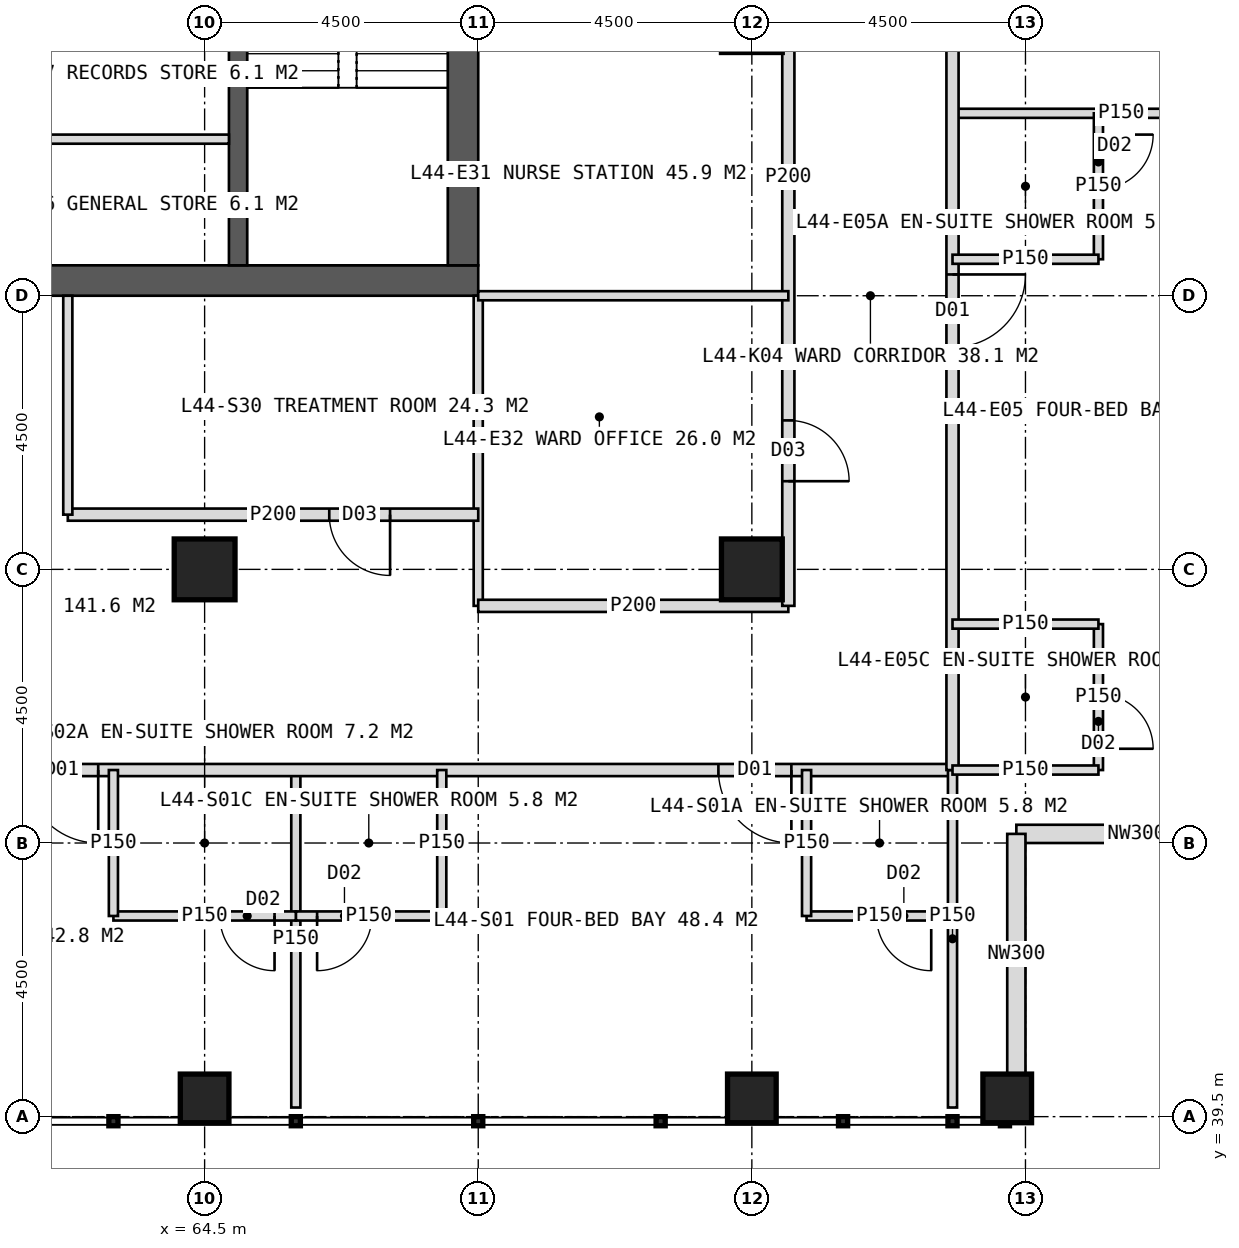
"""IFC4 building model, lengths in metres.
Left out: names, types, materials, properties, quantities, classifications, styles, units other than length and angle.
Written with IfcOpenShell. Run it as: python <this file> out.ifc"""

import sys

from ifc_helpers import new_model, si_unit, direction, frame, frame_2d, origin, origin_2d, place, context, subcontext, project, spatial, rectangle, hollow_rectangle, extrude, element, fill, save


model = new_model("IFC4")
c1 = context("Model", 3, precision=1e-05, world=origin(), true_north=direction((0.0, 1.0)))
c2 = subcontext(c1, "Body", "Model", "MODEL_VIEW")
j1 = project(units=[si_unit("LENGTHUNIT", "METRE"), si_unit("PLANEANGLEUNIT", "RADIAN")], contexts=[c1])
p1 = place(None, origin())
s1 = spatial("IfcSite", under=j1, at=p1, CompositionType="ELEMENT")
p2 = place(p1, origin())
s2 = spatial("IfcBuilding", under=s1, at=p2, CompositionType="ELEMENT")
p3 = place(p2, frame((0.0, 0.0, 185.0)))
s3 = spatial("IfcBuildingStorey", under=s2, at=p3, CompositionType="ELEMENT", Elevation=185.0)
p4 = place(p3, frame((51.0, 53.25, 0.0), z_axis=(0.0, 0.0, 1.0), x_axis=(1.0, 0.0, 0.0)))
e1 = element("IfcWall", 1, at=p4, inside=s3, PredefinedType="SHEAR", context=c2, shape_type="SweptSolid", body=[
    extrude(rectangle(XDim=18.0, YDim=0.5, at=frame_2d((9.0, 0.0))), origin(), (0.0, 0.0, 1.0), 4.0),
])
p5 = place(p4, frame((8.1, 0.0, 0.0)))
e2 = element("IfcOpeningElement", 2, at=p5, cuts=e1, PredefinedType="OPENING", context=c2, shape_type="SweptSolid", body=[
    extrude(rectangle(XDim=1.8, YDim=2.2, at=frame_2d((0.9, 1.1))), frame((0.0, 0.26, 0.0), z_axis=(0.0, -1.0, 0.0), x_axis=(1.0, 0.0, 0.0)), (0.0, 0.0, 1.0), 0.52),
])
p6 = place(p3, frame((68.75, 53.5, 0.0), z_axis=(0.0, 0.0, 1.0), x_axis=(0.0, 1.0, 0.0)))
e3 = element("IfcWall", 3, at=p6, inside=s3, PredefinedType="SHEAR", context=c2, shape_type="SweptSolid", body=[
    extrude(rectangle(XDim=17.0, YDim=0.5, at=frame_2d((8.5, 0.0))), origin(), (0.0, 0.0, 1.0), 4.0),
])
p7 = place(p6, frame((9.6, 0.0, 0.0)))
e4 = element("IfcOpeningElement", 4, at=p7, cuts=e3, PredefinedType="OPENING", context=c2, shape_type="SweptSolid", body=[
    extrude(rectangle(XDim=1.5, YDim=2.2, at=frame_2d((0.75, 1.1))), frame((0.0, 0.26, 0.0), z_axis=(0.0, -1.0, 0.0), x_axis=(1.0, 0.0, 0.0)), (0.0, 0.0, 1.0), 0.52),
])
p8 = place(p3, frame((65.05, 53.5, 0.0), z_axis=(0.0, 0.0, 1.0), x_axis=(0.0, 1.0, 0.0)))
e5 = element("IfcWall", 5, at=p8, inside=s3, PredefinedType="SHEAR", context=c2, shape_type="SweptSolid", body=[
    extrude(rectangle(XDim=17.0, YDim=0.3, at=frame_2d((8.5, 0.0))), origin(), (0.0, 0.0, 1.0), 4.0),
])
for number, where, z_axis, x_axis in (
    (6, (73.5, 48.5, 0.0), (0.0, 0.0, 1.0), (1.0, 0.0, 0.0)),
    (7, (64.5, 48.5, 0.0), (0.0, 0.0, 1.0), (1.0, 0.0, 0.0)),
):
    element("IfcColumn", number, at=place(p3, frame(where, z_axis=z_axis, x_axis=x_axis)), inside=s3, PredefinedType="COLUMN", context=c2, shape_type="SweptSolid", body=[
        extrude(hollow_rectangle(XDim=1.0, YDim=1.0, WallThickness=0.1, at=origin_2d()), origin(), (0.0, 0.0, 1.0), 4.0),
    ])
for number, where, z_axis, x_axis in (
    (8, (64.5, 39.8, 0.0), (0.0, 0.0, 1.0), (1.0, 0.0, 0.0)),
    (9, (73.5, 39.8, 0.0), (0.0, 0.0, 1.0), (1.0, 0.0, 0.0)),
    (10, (77.7, 39.8, 0.0), (0.0, 0.0, 1.0), (1.0, 0.0, 0.0)),
):
    element("IfcColumn", number, at=place(p3, frame(where, z_axis=z_axis, x_axis=x_axis)), inside=s3, PredefinedType="COLUMN", context=c2, shape_type="SweptSolid", body=[
        extrude(hollow_rectangle(XDim=0.8, YDim=0.8, WallThickness=0.08, at=origin_2d()), origin(), (0.0, 0.0, 1.0), 4.0),
    ])
for number, where, z_axis, x_axis in (
    (11, (81.8, 44.15, 0.0), (0.0, 0.0, 1.0), (-1.0, 0.0, 0.0)),
    (12, (77.85, 44.15, 0.0), (0.0, 0.0, 1.0), (0.0, -1.0, 0.0)),
):
    element("IfcWall", number, at=place(p3, frame(where, z_axis=z_axis, x_axis=x_axis)), inside=s3, PredefinedType="ELEMENTEDWALL", context=c2, shape_type="SweptSolid", body=[
        extrude(rectangle(XDim=3.95, YDim=0.3, at=frame_2d((1.975, 0.0))), origin(), (0.0, 0.0, 1.0), 2.85),
    ])
p9 = place(p3, frame((66.0, 45.2, 0.0), z_axis=(0.0, 0.0, 1.0), x_axis=(0.0, -1.0, 0.0)))
e13 = element("IfcWall", 13, at=p9, inside=s3, PredefinedType="PARTITIONING", context=c2, shape_type="SweptSolid", body=[
    extrude(rectangle(XDim=5.55, YDim=0.15, at=frame_2d((2.775, 0.0))), origin(), (0.0, 0.0, 1.0), 3.75),
])
p10 = place(p3, frame((76.8, 45.2, 0.0), z_axis=(0.0, 0.0, 1.0), x_axis=(-1.0, 0.0, 0.0)))
e14 = element("IfcWall", 14, at=p10, inside=s3, PredefinedType="PARTITIONING", context=c2, shape_type="SweptSolid", body=[
    extrude(rectangle(XDim=33.6, YDim=0.2, at=frame_2d((16.8, 0.0))), origin(), (0.0, 0.0, 1.0), 3.75),
])
p11 = place(p10, frame((2.65, 0.0, 0.0)))
e15 = element("IfcOpeningElement", 15, at=p11, cuts=e14, PredefinedType="OPENING", context=c2, shape_type="SweptSolid", body=[
    extrude(rectangle(XDim=1.2, YDim=2.2, at=frame_2d((0.6, 1.1))), frame((0.0, 0.11, 0.0), z_axis=(0.0, -1.0, 0.0), x_axis=(1.0, 0.0, 0.0)), (0.0, 0.0, 1.0), 0.22),
])
p12 = place(p10, frame((14.05, 0.0, 0.0)))
e16 = element("IfcOpeningElement", 16, at=p12, cuts=e14, PredefinedType="OPENING", context=c2, shape_type="SweptSolid", body=[
    extrude(rectangle(XDim=1.2, YDim=2.2, at=frame_2d((0.6, 1.1))), frame((0.0, 0.11, 0.0), z_axis=(0.0, -1.0, 0.0), x_axis=(1.0, 0.0, 0.0)), (0.0, 0.0, 1.0), 0.22),
])
p13 = place(p10, frame((22.45, 0.0, 0.0)))
e17 = element("IfcOpeningElement", 17, at=p13, cuts=e14, PredefinedType="OPENING", context=c2, shape_type="SweptSolid", body=[
    extrude(rectangle(XDim=1.2, YDim=2.2, at=frame_2d((0.6, 1.1))), frame((0.0, 0.11, 0.0), z_axis=(0.0, -1.0, 0.0), x_axis=(1.0, 0.0, 0.0)), (0.0, 0.0, 1.0), 0.22),
])
p14 = place(p3, frame((76.8, 45.2, 0.0), z_axis=(0.0, 0.0, 1.0), x_axis=(0.0, -1.0, 0.0)))
e18 = element("IfcWall", 18, at=p14, inside=s3, PredefinedType="PARTITIONING", context=c2, shape_type="SweptSolid", body=[
    extrude(rectangle(XDim=5.55, YDim=0.15, at=frame_2d((2.775, 0.0))), origin(), (0.0, 0.0, 1.0), 3.75),
])
p15 = place(p3, frame((76.8, 42.8, 0.0), z_axis=(0.0, 0.0, 1.0), x_axis=(-1.0, 0.0, 0.0)))
e19 = element("IfcWall", 19, at=p15, inside=s3, PredefinedType="PARTITIONING", context=c2, shape_type="SweptSolid", body=[
    extrude(rectangle(XDim=2.4, YDim=0.15, at=frame_2d((1.2, 0.0))), origin(), (0.0, 0.0, 1.0), 3.75),
])
p16 = place(p15, frame((0.35, 0.0, 0.0)))
e20 = element("IfcOpeningElement", 20, at=p16, cuts=e19, PredefinedType="OPENING", context=c2, shape_type="SweptSolid", body=[
    extrude(rectangle(XDim=0.9, YDim=2.1, at=frame_2d((0.45, 1.05))), frame((0.0, 0.085, 0.0), z_axis=(0.0, -1.0, 0.0), x_axis=(1.0, 0.0, 0.0)), (0.0, 0.0, 1.0), 0.17),
])
p17 = place(p3, frame((74.4, 45.2, 0.0), z_axis=(0.0, 0.0, 1.0), x_axis=(0.0, -1.0, 0.0)))
e21 = element("IfcWall", 21, at=p17, inside=s3, PredefinedType="PARTITIONING", context=c2, shape_type="SweptSolid", body=[
    extrude(rectangle(XDim=2.4, YDim=0.15, at=frame_2d((1.2, 0.0))), origin(), (0.0, 0.0, 1.0), 3.75),
])
p18 = place(p3, frame((68.4, 42.8, 0.0), z_axis=(0.0, 0.0, 1.0), x_axis=(-1.0, 0.0, 0.0)))
e22 = element("IfcWall", 22, at=p18, inside=s3, PredefinedType="PARTITIONING", context=c2, shape_type="SweptSolid", body=[
    extrude(rectangle(XDim=2.4, YDim=0.15, at=frame_2d((1.2, 0.0))), origin(), (0.0, 0.0, 1.0), 3.75),
])
p19 = place(p18, frame((1.15, 0.0, 0.0)))
e23 = element("IfcOpeningElement", 23, at=p19, cuts=e22, PredefinedType="OPENING", context=c2, shape_type="SweptSolid", body=[
    extrude(rectangle(XDim=0.9, YDim=2.1, at=frame_2d((0.45, 1.05))), frame((0.0, 0.085, 0.0), z_axis=(0.0, -1.0, 0.0), x_axis=(1.0, 0.0, 0.0)), (0.0, 0.0, 1.0), 0.17),
])
p20 = place(p3, frame((68.4, 45.2, 0.0), z_axis=(0.0, 0.0, 1.0), x_axis=(0.0, -1.0, 0.0)))
e24 = element("IfcWall", 24, at=p20, inside=s3, PredefinedType="PARTITIONING", context=c2, shape_type="SweptSolid", body=[
    extrude(rectangle(XDim=2.4, YDim=0.15, at=frame_2d((1.2, 0.0))), origin(), (0.0, 0.0, 1.0), 3.75),
])
p21 = place(p3, frame((66.0, 42.8, 0.0), z_axis=(0.0, 0.0, 1.0), x_axis=(-1.0, 0.0, 0.0)))
e25 = element("IfcWall", 25, at=p21, inside=s3, PredefinedType="PARTITIONING", context=c2, shape_type="SweptSolid", body=[
    extrude(rectangle(XDim=3.0, YDim=0.15, at=frame_2d((1.5, 0.0))), origin(), (0.0, 0.0, 1.0), 3.75),
])
p22 = place(p21, frame((0.35, 0.0, 0.0)))
e26 = element("IfcOpeningElement", 26, at=p22, cuts=e25, PredefinedType="OPENING", context=c2, shape_type="SweptSolid", body=[
    extrude(rectangle(XDim=0.9, YDim=2.1, at=frame_2d((0.45, 1.05))), frame((0.0, 0.085, 0.0), z_axis=(0.0, -1.0, 0.0), x_axis=(1.0, 0.0, 0.0)), (0.0, 0.0, 1.0), 0.17),
])
p23 = place(p3, frame((63.0, 45.2, 0.0), z_axis=(0.0, 0.0, 1.0), x_axis=(0.0, -1.0, 0.0)))
e27 = element("IfcWall", 27, at=p23, inside=s3, PredefinedType="PARTITIONING", context=c2, shape_type="SweptSolid", body=[
    extrude(rectangle(XDim=2.4, YDim=0.15, at=frame_2d((1.2, 0.0))), origin(), (0.0, 0.0, 1.0), 3.75),
])
p24 = place(p3, frame((69.0, 53.0, 0.0), z_axis=(0.0, 0.0, 1.0), x_axis=(0.0, -1.0, 0.0)))
e28 = element("IfcWall", 28, at=p24, inside=s3, PredefinedType="PARTITIONING", context=c2, shape_type="SweptSolid", body=[
    extrude(rectangle(XDim=5.1, YDim=0.15, at=frame_2d((2.55, 0.0))), origin(), (0.0, 0.0, 1.0), 3.75),
])
p25 = place(p3, frame((74.1, 47.9, 0.0), z_axis=(0.0, 0.0, 1.0), x_axis=(-1.0, 0.0, 0.0)))
e29 = element("IfcWall", 29, at=p25, inside=s3, PredefinedType="PARTITIONING", context=c2, shape_type="SweptSolid", body=[
    extrude(rectangle(XDim=5.1, YDim=0.2, at=frame_2d((2.55, 0.0))), origin(), (0.0, 0.0, 1.0), 3.75),
])
p26 = place(p3, frame((69.0, 49.4, 0.0), z_axis=(0.0, 0.0, 1.0), x_axis=(-1.0, 0.0, 0.0)))
e30 = element("IfcWall", 30, at=p26, inside=s3, PredefinedType="PARTITIONING", context=c2, shape_type="SweptSolid", body=[
    extrude(rectangle(XDim=6.75, YDim=0.2, at=frame_2d((3.375, 0.0))), origin(), (0.0, 0.0, 1.0), 3.75),
])
p27 = place(p26, frame((1.45, 0.0, 0.0)))
e31 = element("IfcOpeningElement", 31, at=p27, cuts=e30, PredefinedType="OPENING", context=c2, shape_type="SweptSolid", body=[
    extrude(rectangle(XDim=1.0, YDim=2.1, at=frame_2d((0.5, 1.05))), frame((0.0, 0.11, 0.0), z_axis=(0.0, -1.0, 0.0), x_axis=(1.0, 0.0, 0.0)), (0.0, 0.0, 1.0), 0.22),
])
p28 = place(p3, frame((62.25, 53.0, 0.0), z_axis=(0.0, 0.0, 1.0), x_axis=(0.0, -1.0, 0.0)))
e32 = element("IfcWall", 32, at=p28, inside=s3, PredefinedType="PARTITIONING", context=c2, shape_type="SweptSolid", body=[
    extrude(rectangle(XDim=3.6, YDim=0.15, at=frame_2d((1.8, 0.0))), origin(), (0.0, 0.0, 1.0), 3.75),
])
p29 = place(p3, frame((76.8, 56.0, 0.0), z_axis=(0.0, 0.0, 1.0), x_axis=(1.0, 0.0, 0.0)))
e33 = element("IfcWall", 33, at=p29, inside=s3, PredefinedType="PARTITIONING", context=c2, shape_type="SweptSolid", body=[
    extrude(rectangle(XDim=5.55, YDim=0.15, at=frame_2d((2.775, 0.0))), origin(), (0.0, 0.0, 1.0), 3.75),
])
p30 = place(p3, frame((76.8, 78.8, 0.0), z_axis=(0.0, 0.0, 1.0), x_axis=(0.0, -1.0, 0.0)))
e34 = element("IfcWall", 34, at=p30, inside=s3, PredefinedType="PARTITIONING", context=c2, shape_type="SweptSolid", body=[
    extrude(rectangle(XDim=33.6, YDim=0.2, at=frame_2d((16.8, 0.0))), origin(), (0.0, 0.0, 1.0), 3.75),
])
p31 = place(p30, frame((2.65, 0.0, 0.0)))
e35 = element("IfcOpeningElement", 35, at=p31, cuts=e34, PredefinedType="OPENING", context=c2, shape_type="SweptSolid", body=[
    extrude(rectangle(XDim=1.2, YDim=2.2, at=frame_2d((0.6, 1.1))), frame((0.0, 0.11, 0.0), z_axis=(0.0, -1.0, 0.0), x_axis=(1.0, 0.0, 0.0)), (0.0, 0.0, 1.0), 0.22),
])
p32 = place(p30, frame((7.45, 0.0, 0.0)))
e36 = element("IfcOpeningElement", 36, at=p32, cuts=e34, PredefinedType="OPENING", context=c2, shape_type="SweptSolid", body=[
    extrude(rectangle(XDim=1.2, YDim=2.2, at=frame_2d((0.6, 1.1))), frame((0.0, 0.11, 0.0), z_axis=(0.0, -1.0, 0.0), x_axis=(1.0, 0.0, 0.0)), (0.0, 0.0, 1.0), 0.22),
])
p33 = place(p30, frame((13.45, 0.0, 0.0)))
e37 = element("IfcOpeningElement", 37, at=p33, cuts=e34, PredefinedType="OPENING", context=c2, shape_type="SweptSolid", body=[
    extrude(rectangle(XDim=1.2, YDim=2.2, at=frame_2d((0.6, 1.1))), frame((0.0, 0.11, 0.0), z_axis=(0.0, -1.0, 0.0), x_axis=(1.0, 0.0, 0.0)), (0.0, 0.0, 1.0), 0.22),
])
p34 = place(p30, frame((19.45, 0.0, 0.0)))
e38 = element("IfcOpeningElement", 38, at=p34, cuts=e34, PredefinedType="OPENING", context=c2, shape_type="SweptSolid", body=[
    extrude(rectangle(XDim=1.2, YDim=2.2, at=frame_2d((0.6, 1.1))), frame((0.0, 0.11, 0.0), z_axis=(0.0, -1.0, 0.0), x_axis=(1.0, 0.0, 0.0)), (0.0, 0.0, 1.0), 0.22),
])
p35 = place(p30, frame((25.45, 0.0, 0.0)))
e39 = element("IfcOpeningElement", 39, at=p35, cuts=e34, PredefinedType="OPENING", context=c2, shape_type="SweptSolid", body=[
    extrude(rectangle(XDim=1.2, YDim=2.2, at=frame_2d((0.6, 1.1))), frame((0.0, 0.11, 0.0), z_axis=(0.0, -1.0, 0.0), x_axis=(1.0, 0.0, 0.0)), (0.0, 0.0, 1.0), 0.22),
])
p36 = place(p3, frame((79.2, 56.0, 0.0), z_axis=(0.0, 0.0, 1.0), x_axis=(0.0, -1.0, 0.0)))
e40 = element("IfcWall", 40, at=p36, inside=s3, PredefinedType="PARTITIONING", context=c2, shape_type="SweptSolid", body=[
    extrude(rectangle(XDim=2.4, YDim=0.15, at=frame_2d((1.2, 0.0))), origin(), (0.0, 0.0, 1.0), 3.75),
])
p37 = place(p36, frame((0.35, 0.0, 0.0)))
e41 = element("IfcOpeningElement", 41, at=p37, cuts=e40, PredefinedType="OPENING", context=c2, shape_type="SweptSolid", body=[
    extrude(rectangle(XDim=0.9, YDim=2.1, at=frame_2d((0.45, 1.05))), frame((0.0, 0.085, 0.0), z_axis=(0.0, -1.0, 0.0), x_axis=(1.0, 0.0, 0.0)), (0.0, 0.0, 1.0), 0.17),
])
p38 = place(p3, frame((76.8, 53.6, 0.0), z_axis=(0.0, 0.0, 1.0), x_axis=(1.0, 0.0, 0.0)))
e42 = element("IfcWall", 42, at=p38, inside=s3, PredefinedType="PARTITIONING", context=c2, shape_type="SweptSolid", body=[
    extrude(rectangle(XDim=2.4, YDim=0.15, at=frame_2d((1.2, 0.0))), origin(), (0.0, 0.0, 1.0), 3.75),
])
p39 = place(p3, frame((79.2, 47.6, 0.0), z_axis=(0.0, 0.0, 1.0), x_axis=(0.0, -1.0, 0.0)))
e43 = element("IfcWall", 43, at=p39, inside=s3, PredefinedType="PARTITIONING", context=c2, shape_type="SweptSolid", body=[
    extrude(rectangle(XDim=2.4, YDim=0.15, at=frame_2d((1.2, 0.0))), origin(), (0.0, 0.0, 1.0), 3.75),
])
p40 = place(p39, frame((1.15, 0.0, 0.0)))
e44 = element("IfcOpeningElement", 44, at=p40, cuts=e43, PredefinedType="OPENING", context=c2, shape_type="SweptSolid", body=[
    extrude(rectangle(XDim=0.9, YDim=2.1, at=frame_2d((0.45, 1.05))), frame((0.0, 0.085, 0.0), z_axis=(0.0, -1.0, 0.0), x_axis=(1.0, 0.0, 0.0)), (0.0, 0.0, 1.0), 0.17),
])
for number, where, z_axis, x_axis in (
    (45, (76.8, 47.6, 0.0), (0.0, 0.0, 1.0), (1.0, 0.0, 0.0)),
    (46, (76.8, 45.2, 0.0), (0.0, 0.0, 1.0), (1.0, 0.0, 0.0)),
):
    element("IfcWall", number, at=place(p3, frame(where, z_axis=z_axis, x_axis=x_axis)), inside=s3, PredefinedType="PARTITIONING", context=c2, shape_type="SweptSolid", body=[
        extrude(rectangle(XDim=2.4, YDim=0.15, at=frame_2d((1.2, 0.0))), origin(), (0.0, 0.0, 1.0), 3.75),
    ])
p41 = place(p3, frame((74.1, 62.0, 0.0), z_axis=(0.0, 0.0, 1.0), x_axis=(0.0, -1.0, 0.0)))
e47 = element("IfcWall", 47, at=p41, inside=s3, PredefinedType="PARTITIONING", context=c2, shape_type="SweptSolid", body=[
    extrude(rectangle(XDim=14.1, YDim=0.2, at=frame_2d((7.05, 0.0))), origin(), (0.0, 0.0, 1.0), 3.75),
])
p42 = place(p41, frame((1.45, 0.0, 0.0)))
e48 = element("IfcOpeningElement", 48, at=p42, cuts=e47, PredefinedType="OPENING", context=c2, shape_type="SweptSolid", body=[
    extrude(rectangle(XDim=1.0, YDim=2.1, at=frame_2d((0.5, 1.05))), frame((0.0, 0.11, 0.0), z_axis=(0.0, -1.0, 0.0), x_axis=(1.0, 0.0, 0.0)), (0.0, 0.0, 1.0), 0.22),
])
p43 = place(p41, frame((11.05, 0.0, 0.0)))
e49 = element("IfcOpeningElement", 49, at=p43, cuts=e47, PredefinedType="OPENING", context=c2, shape_type="SweptSolid", body=[
    extrude(rectangle(XDim=1.0, YDim=2.1, at=frame_2d((0.5, 1.05))), frame((0.0, 0.11, 0.0), z_axis=(0.0, -1.0, 0.0), x_axis=(1.0, 0.0, 0.0)), (0.0, 0.0, 1.0), 0.22),
])
p44 = place(p3, frame((69.0, 53.0, 0.0), z_axis=(0.0, 0.0, 1.0), x_axis=(1.0, 0.0, 0.0)))
e50 = element("IfcWall", 50, at=p44, inside=s3, PredefinedType="PARTITIONING", context=c2, shape_type="SweptSolid", body=[
    extrude(rectangle(XDim=5.1, YDim=0.15, at=frame_2d((2.55, 0.0))), origin(), (0.0, 0.0, 1.0), 3.75),
])
p45 = place(p3, frame((61.85, 55.575, 0.0), z_axis=(0.0, 0.0, 1.0), x_axis=(1.0, 0.0, 0.0)))
e51 = element("IfcWall", 51, at=p45, inside=s3, PredefinedType="PARTITIONING", context=c2, shape_type="SweptSolid", body=[
    extrude(rectangle(XDim=3.05, YDim=0.15, at=frame_2d((1.525, 0.0))), origin(), (0.0, 0.0, 1.0), 3.75),
])
p46 = place(p11, origin())
e52 = element("IfcDoor", 52, at=p46, inside=s3, OperationType="SINGLE_SWING_LEFT", PredefinedType="DOOR", context=c2, shape_type="SweptSolid", body=[
    extrude(rectangle(XDim=1.2, YDim=2.2, at=frame_2d((0.6, 1.1))), frame((0.0, 0.025, 0.0), z_axis=(0.0, -1.0, 0.0), x_axis=(1.0, 0.0, 0.0)), (0.0, 0.0, 1.0), 0.05),
])
fill(e15, e52)
p47 = place(p16, origin())
e53 = element("IfcDoor", 53, at=p47, inside=s3, OperationType="SINGLE_SWING_LEFT", PredefinedType="DOOR", context=c2, shape_type="SweptSolid", body=[
    extrude(rectangle(XDim=0.9, YDim=2.1, at=frame_2d((0.45, 1.05))), frame((0.0, 0.025, 0.0), z_axis=(0.0, -1.0, 0.0), x_axis=(1.0, 0.0, 0.0)), (0.0, 0.0, 1.0), 0.05),
])
fill(e20, e53)
p48 = place(p19, origin())
e54 = element("IfcDoor", 54, at=p48, inside=s3, OperationType="SINGLE_SWING_RIGHT", PredefinedType="DOOR", context=c2, shape_type="SweptSolid", body=[
    extrude(rectangle(XDim=0.9, YDim=2.1, at=frame_2d((0.45, 1.05))), frame((0.0, 0.025, 0.0), z_axis=(0.0, -1.0, 0.0), x_axis=(1.0, 0.0, 0.0)), (0.0, 0.0, 1.0), 0.05),
])
fill(e23, e54)
p49 = place(p12, origin())
e55 = element("IfcDoor", 55, at=p49, inside=s3, OperationType="SINGLE_SWING_LEFT", PredefinedType="DOOR", context=c2, shape_type="SweptSolid", body=[
    extrude(rectangle(XDim=1.2, YDim=2.2, at=frame_2d((0.6, 1.1))), frame((0.0, 0.025, 0.0), z_axis=(0.0, -1.0, 0.0), x_axis=(1.0, 0.0, 0.0)), (0.0, 0.0, 1.0), 0.05),
])
fill(e16, e55)
p50 = place(p22, origin())
e56 = element("IfcDoor", 56, at=p50, inside=s3, OperationType="SINGLE_SWING_LEFT", PredefinedType="DOOR", context=c2, shape_type="SweptSolid", body=[
    extrude(rectangle(XDim=0.9, YDim=2.1, at=frame_2d((0.45, 1.05))), frame((0.0, 0.025, 0.0), z_axis=(0.0, -1.0, 0.0), x_axis=(1.0, 0.0, 0.0)), (0.0, 0.0, 1.0), 0.05),
])
fill(e26, e56)
p51 = place(p27, origin())
e57 = element("IfcDoor", 57, at=p51, inside=s3, OperationType="SINGLE_SWING_LEFT", PredefinedType="DOOR", context=c2, shape_type="SweptSolid", body=[
    extrude(rectangle(XDim=1.0, YDim=2.1, at=frame_2d((0.5, 1.05))), frame((0.0, 0.025, 0.0), z_axis=(0.0, -1.0, 0.0), x_axis=(1.0, 0.0, 0.0)), (0.0, 0.0, 1.0), 0.05),
])
fill(e31, e57)
p52 = place(p35, origin())
e58 = element("IfcDoor", 58, at=p52, inside=s3, OperationType="SINGLE_SWING_LEFT", PredefinedType="DOOR", context=c2, shape_type="SweptSolid", body=[
    extrude(rectangle(XDim=1.2, YDim=2.2, at=frame_2d((0.6, 1.1))), frame((0.0, 0.025, 0.0), z_axis=(0.0, -1.0, 0.0), x_axis=(1.0, 0.0, 0.0)), (0.0, 0.0, 1.0), 0.05),
])
fill(e39, e58)
p53 = place(p37, origin())
e59 = element("IfcDoor", 59, at=p53, inside=s3, OperationType="SINGLE_SWING_LEFT", PredefinedType="DOOR", context=c2, shape_type="SweptSolid", body=[
    extrude(rectangle(XDim=0.9, YDim=2.1, at=frame_2d((0.45, 1.05))), frame((0.0, 0.025, 0.0), z_axis=(0.0, -1.0, 0.0), x_axis=(1.0, 0.0, 0.0)), (0.0, 0.0, 1.0), 0.05),
])
fill(e41, e59)
p54 = place(p40, origin())
e60 = element("IfcDoor", 60, at=p54, inside=s3, OperationType="SINGLE_SWING_RIGHT", PredefinedType="DOOR", context=c2, shape_type="SweptSolid", body=[
    extrude(rectangle(XDim=0.9, YDim=2.1, at=frame_2d((0.45, 1.05))), frame((0.0, 0.025, 0.0), z_axis=(0.0, -1.0, 0.0), x_axis=(1.0, 0.0, 0.0)), (0.0, 0.0, 1.0), 0.05),
])
fill(e44, e60)
p55 = place(p43, origin())
e61 = element("IfcDoor", 61, at=p55, inside=s3, OperationType="SINGLE_SWING_RIGHT", PredefinedType="DOOR", context=c2, shape_type="SweptSolid", body=[
    extrude(rectangle(XDim=1.0, YDim=2.1, at=frame_2d((0.5, 1.05))), frame((0.0, 0.025, 0.0), z_axis=(0.0, -1.0, 0.0), x_axis=(1.0, 0.0, 0.0)), (0.0, 0.0, 1.0), 0.05),
])
fill(e49, e61)
save(model, sys.argv[1])
